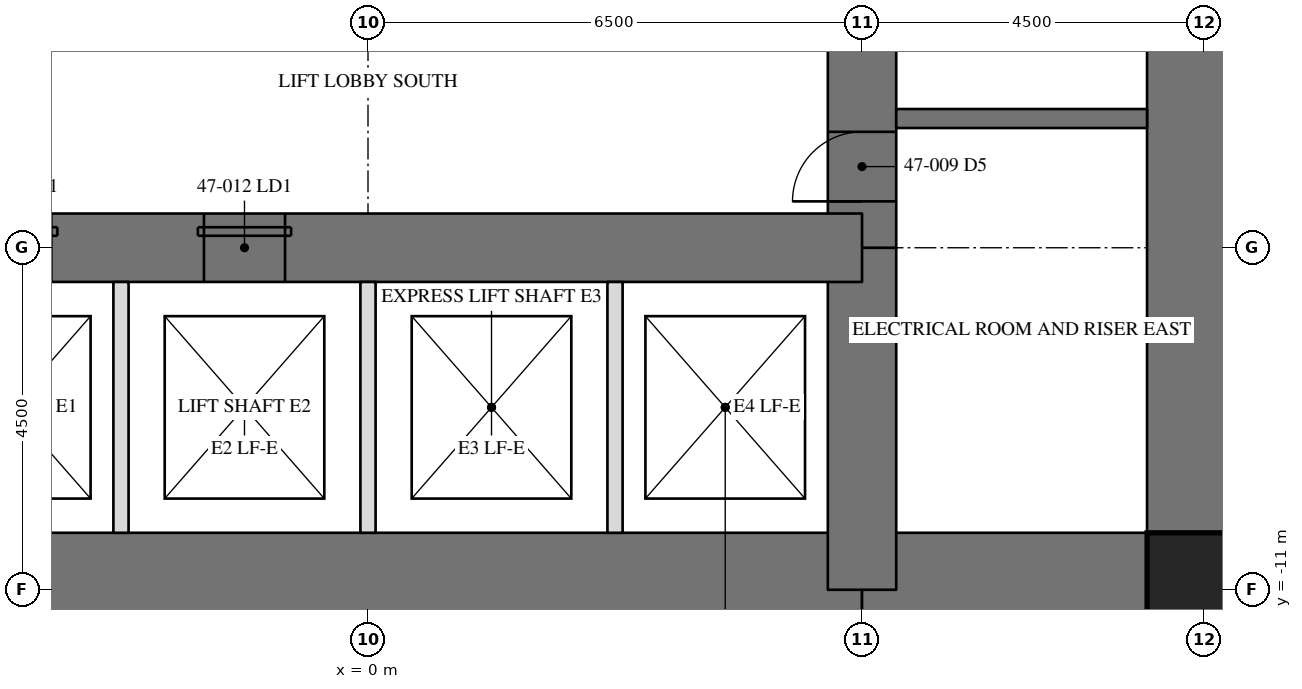
"""IFC4 building model, lengths in metres.
Left out: names, types, materials, properties, quantities, classifications, styles, units other than length and angle.
Written with IfcOpenShell. Run it as: python <this file> out.ifc"""

import sys

from ifc_helpers import new_model, si_unit, direction, frame, frame_2d, origin, origin_2d, place, context, subcontext, project, spatial, rectangle, hollow_rectangle, extrude, element, fill, save


model = new_model("IFC4")
c1 = context("Model", 3, precision=1e-05, world=origin(), true_north=direction((0.0, 1.0)))
c2 = subcontext(c1, "Body", "Model", "MODEL_VIEW")
j1 = project(units=[si_unit("LENGTHUNIT", "METRE"), si_unit("PLANEANGLEUNIT", "RADIAN")], contexts=[c1])
p1 = place(None, origin())
s1 = spatial("IfcSite", under=j1, at=p1, CompositionType="ELEMENT")
p2 = place(p1, origin())
s2 = spatial("IfcBuilding", under=s1, at=p2, CompositionType="ELEMENT")
p3 = place(p2, frame((0.0, 0.0, 201.2)))
s3 = spatial("IfcBuildingStorey", under=s2, at=p3, CompositionType="ELEMENT", Elevation=201.2)
p4 = place(p3, frame((11.0, -11.0, 0.0), z_axis=(0.0, 0.0, 1.0), x_axis=(0.0, 1.0, 0.0)))
e1 = element("IfcWall", 1, at=p4, inside=s3, PredefinedType="SHEAR", context=c2, shape_type="SweptSolid", body=[
    extrude(rectangle(XDim=22.0, YDim=1.5, at=frame_2d((11.0, 0.0))), origin(), (0.0, 0.0, 1.0), 3.5),
])
p5 = place(p4, frame((15.393, 0.0, 0.0)))
e2 = element("IfcOpeningElement", 2, at=p5, cuts=e1, PredefinedType="OPENING", context=c2, shape_type="SweptSolid", body=[
    extrude(rectangle(XDim=0.915, YDim=2.134, at=frame_2d((0.458, 1.067))), frame((0.0, 0.76, 0.0), z_axis=(0.0, -1.0, 0.0), x_axis=(1.0, 0.0, 0.0)), (0.0, 0.0, 1.0), 1.52),
])
p6 = place(p3, frame((-6.5, -11.0, 0.0), z_axis=(0.0, 0.0, 1.0), x_axis=(1.0, 0.0, 0.0)))
e3 = element("IfcWall", 3, at=p6, inside=s3, PredefinedType="SHEAR", context=c2, shape_type="SweptSolid", body=[
    extrude(rectangle(XDim=13.0, YDim=1.5, at=frame_2d((6.5, 0.0))), origin(), (0.0, 0.0, 1.0), 3.5),
])
p7 = place(p3, frame((6.5, -11.0, 0.0), z_axis=(0.0, 0.0, 1.0), x_axis=(1.0, 0.0, 0.0)))
e4 = element("IfcWall", 4, at=p7, inside=s3, PredefinedType="SHEAR", context=c2, shape_type="SweptSolid", body=[
    extrude(rectangle(XDim=4.5, YDim=1.5, at=frame_2d((2.25, 0.0))), origin(), (0.0, 0.0, 1.0), 3.5),
])
p8 = place(p3, frame((6.5, -11.0, 0.0), z_axis=(0.0, 0.0, 1.0), x_axis=(0.0, 1.0, 0.0)))
e5 = element("IfcWall", 5, at=p8, inside=s3, PredefinedType="SHEAR", context=c2, shape_type="SweptSolid", body=[
    extrude(rectangle(XDim=4.5, YDim=0.9, at=frame_2d((2.25, 0.0))), origin(), (0.0, 0.0, 1.0), 3.5),
])
p9 = place(p3, frame((6.5, -6.5, 0.0), z_axis=(0.0, 0.0, 1.0), x_axis=(0.0, 1.0, 0.0)))
e6 = element("IfcWall", 6, at=p9, inside=s3, PredefinedType="SHEAR", context=c2, shape_type="SweptSolid", body=[
    extrude(rectangle(XDim=13.0, YDim=0.9, at=frame_2d((6.5, 0.0))), origin(), (0.0, 0.0, 1.0), 3.5),
])
p10 = place(p9, frame((10.893, 0.0, 0.0)))
e7 = element("IfcOpeningElement", 7, at=p10, cuts=e6, PredefinedType="OPENING", context=c2, shape_type="SweptSolid", body=[
    extrude(rectangle(XDim=0.915, YDim=2.134, at=frame_2d((0.458, 1.067))), frame((0.0, 0.46, 0.0), z_axis=(0.0, -1.0, 0.0), x_axis=(1.0, 0.0, 0.0)), (0.0, 0.0, 1.0), 0.92),
])
p11 = place(p9, frame((0.61, 0.0, 0.0)))
e8 = element("IfcOpeningElement", 8, at=p11, cuts=e6, PredefinedType="OPENING", context=c2, shape_type="SweptSolid", body=[
    extrude(rectangle(XDim=0.915, YDim=2.134, at=frame_2d((0.458, 1.067))), frame((0.0, 0.46, 0.0), z_axis=(0.0, -1.0, 0.0), x_axis=(1.0, 0.0, 0.0)), (0.0, 0.0, 1.0), 0.92),
])
p12 = place(p3, frame((-6.5, -6.5, 0.0), z_axis=(0.0, 0.0, 1.0), x_axis=(1.0, 0.0, 0.0)))
e9 = element("IfcWall", 9, at=p12, inside=s3, PredefinedType="SHEAR", context=c2, shape_type="SweptSolid", body=[
    extrude(rectangle(XDim=13.0, YDim=0.9, at=frame_2d((6.5, 0.0))), origin(), (0.0, 0.0, 1.0), 3.5),
])
p13 = place(p12, frame((1.267, 0.0, 0.0)))
e10 = element("IfcOpeningElement", 10, at=p13, cuts=e9, PredefinedType="OPENING", context=c2, shape_type="SweptSolid", body=[
    extrude(rectangle(XDim=1.067, YDim=2.134, at=frame_2d((0.533, 1.067))), frame((0.0, 0.46, 0.0), z_axis=(0.0, -1.0, 0.0), x_axis=(1.0, 0.0, 0.0)), (0.0, 0.0, 1.0), 0.92),
])
p14 = place(p12, frame((4.342, 0.0, 0.0)))
e11 = element("IfcOpeningElement", 11, at=p14, cuts=e9, PredefinedType="OPENING", context=c2, shape_type="SweptSolid", body=[
    extrude(rectangle(XDim=1.067, YDim=2.134, at=frame_2d((0.533, 1.067))), frame((0.0, 0.46, 0.0), z_axis=(0.0, -1.0, 0.0), x_axis=(1.0, 0.0, 0.0)), (0.0, 0.0, 1.0), 0.92),
])
p15 = place(p3, frame((11.0, -11.0, 0.0), z_axis=(0.0, 0.0, 1.0), x_axis=(1.0, 0.0, 0.0)))
e12 = element("IfcColumn", 12, at=p15, inside=s3, PredefinedType="COLUMN", context=c2, shape_type="SweptSolid", body=[
    extrude(hollow_rectangle(XDim=1.499, YDim=1.499, WallThickness=0.102, at=origin_2d()), origin(), (0.0, 0.0, 1.0), 3.5),
])
p16 = place(p3, frame((6.95, -4.8, 0.0), z_axis=(0.0, 0.0, 1.0), x_axis=(1.0, 0.0, 0.0)))
e13 = element("IfcWall", 13, at=p16, inside=s3, PredefinedType="SOLIDWALL", context=c2, shape_type="SweptSolid", body=[
    extrude(rectangle(XDim=3.3, YDim=0.25, at=frame_2d((1.65, 0.0))), origin(), (0.0, 0.0, 1.0), 3.31),
])
for number, where, z_axis, x_axis in (
    (14, (-3.25, -10.25, 0.0), (0.0, 0.0, 1.0), (0.0, 1.0, 0.0)),
    (15, (0.0, -10.25, 0.0), (0.0, 0.0, 1.0), (0.0, 1.0, 0.0)),
    (16, (3.25, -10.25, 0.0), (0.0, 0.0, 1.0), (0.0, 1.0, 0.0)),
):
    element("IfcWall", number, at=place(p3, frame(where, z_axis=z_axis, x_axis=x_axis)), inside=s3, PredefinedType="PARTITIONING", context=c2, shape_type="SweptSolid", body=[
        extrude(rectangle(XDim=3.3, YDim=0.2, at=frame_2d((1.65, 0.0))), origin(), (0.0, 0.0, 1.0), 3.31),
    ])
p17 = place(p11, origin())
e17 = element("IfcDoor", 17, at=p17, inside=s3, OperationType="SINGLE_SWING_RIGHT", PredefinedType="DOOR", context=c2, shape_type="SweptSolid", body=[
    extrude(rectangle(XDim=0.915, YDim=2.134, at=frame_2d((0.458, 1.067))), frame((0.0, -0.375, 0.0), z_axis=(0.0, -1.0, 0.0), x_axis=(1.0, 0.0, 0.0)), (0.0, 0.0, 1.0), 0.05),
])
fill(e8, e17)
p18 = place(p14, origin())
e18 = element("IfcDoor", 18, at=p18, inside=s3, OperationType="SLIDING_TO_LEFT", PredefinedType="DOOR", context=c2, shape_type="SweptSolid", body=[
    extrude(rectangle(XDim=1.067, YDim=2.134, at=frame_2d((0.533, 1.067))), frame((0.0, -0.375, 0.0), z_axis=(0.0, -1.0, 0.0), x_axis=(1.0, 0.0, 0.0)), (0.0, 0.0, 1.0), 0.05),
])
fill(e11, e18)
save(model, sys.argv[1])
